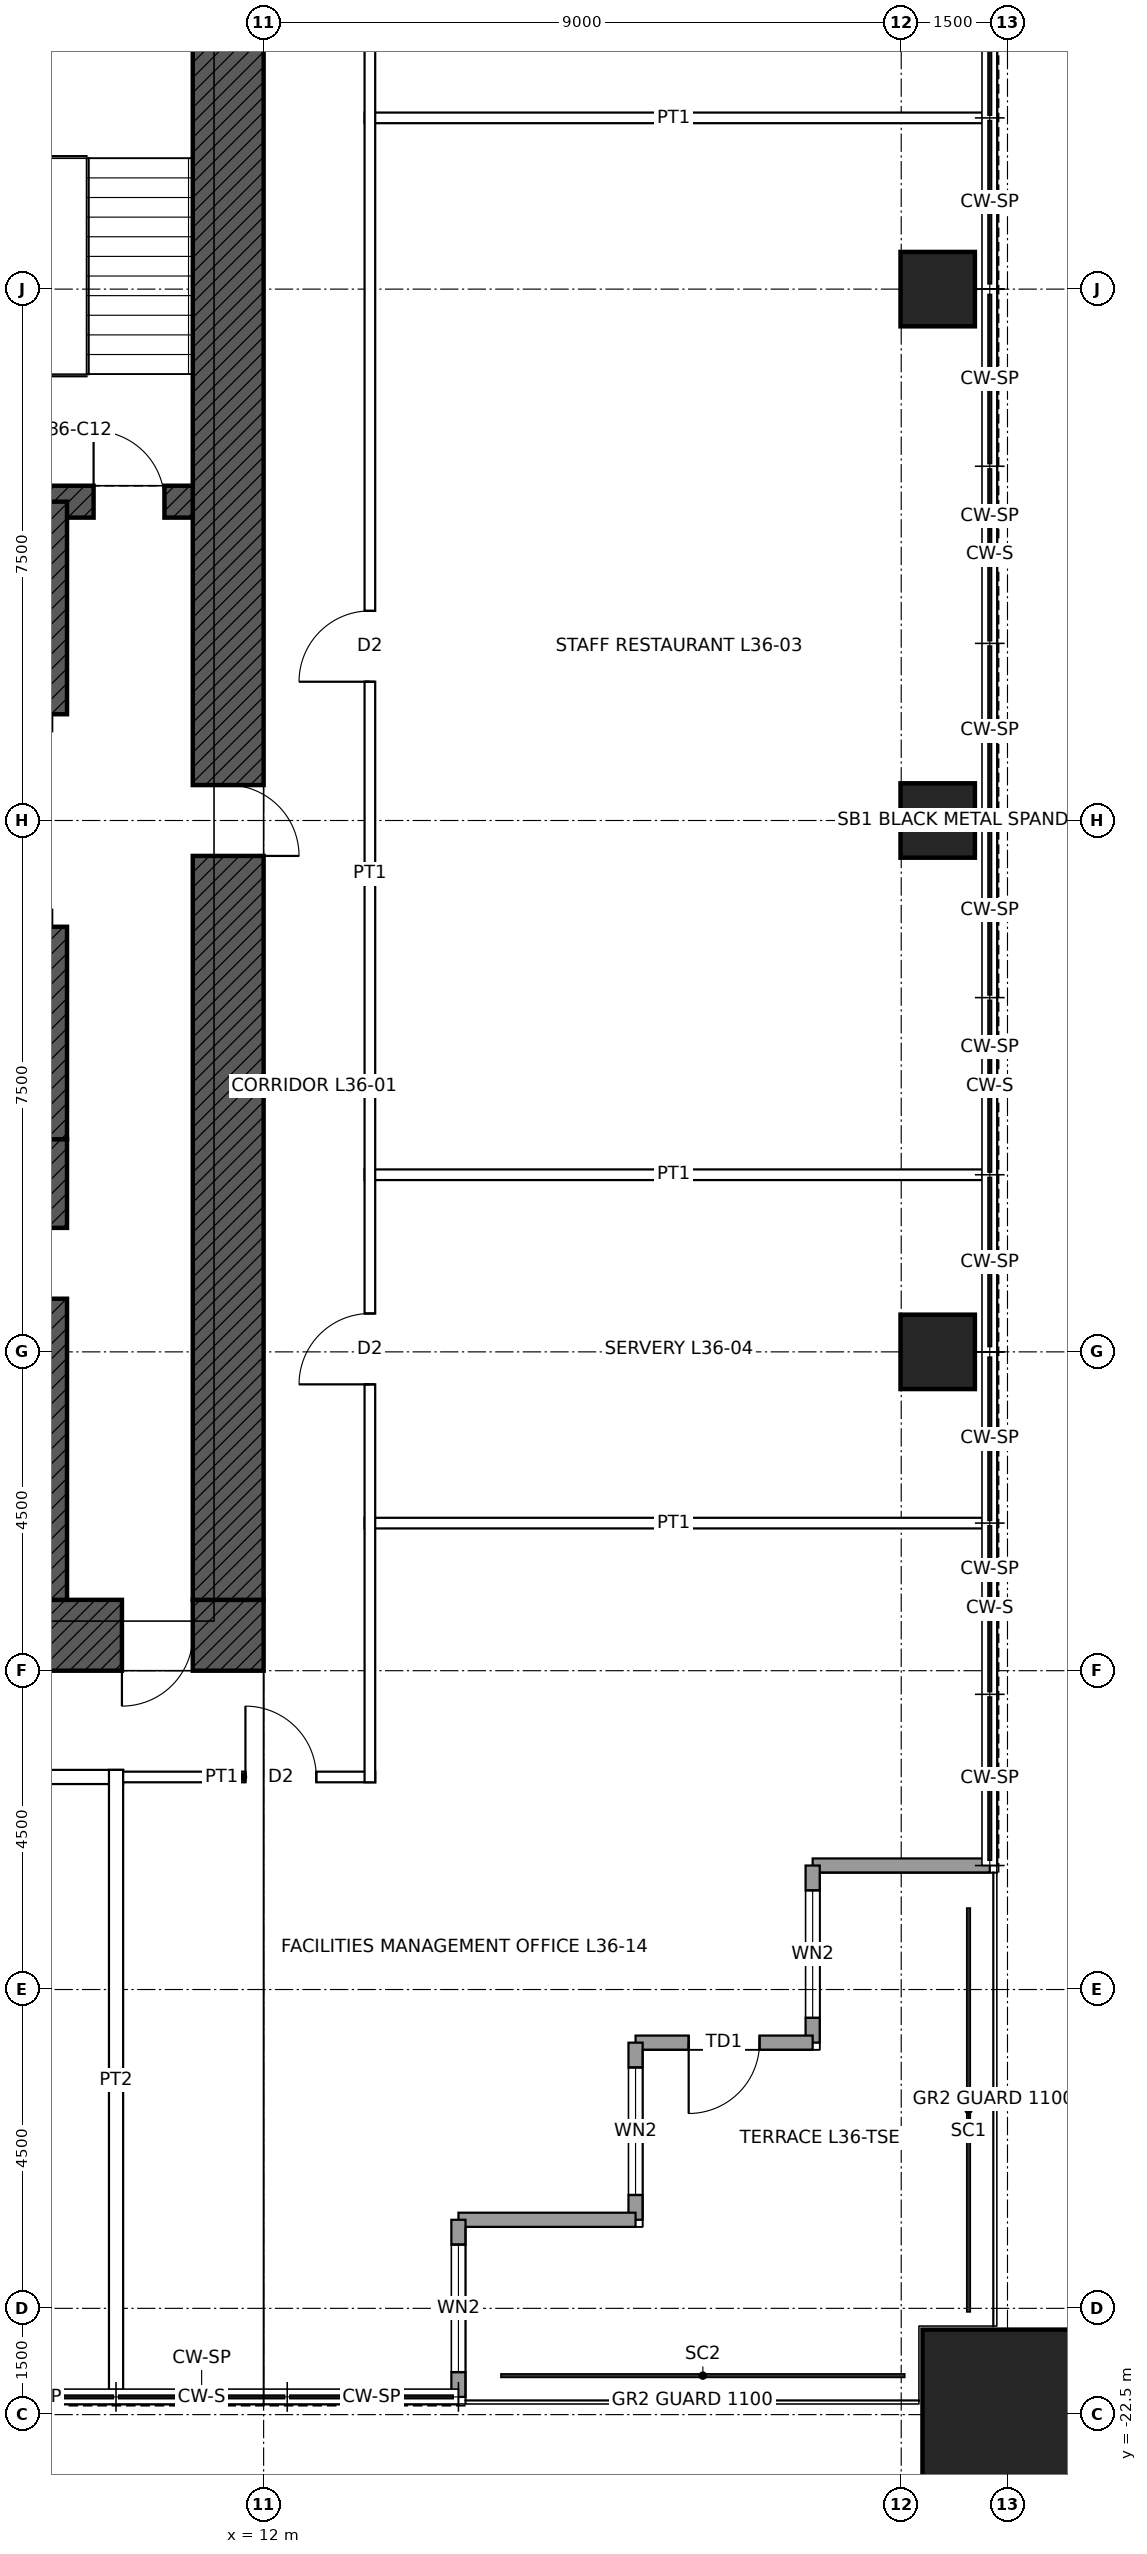
"""IFC4 building model, lengths in metres.
Left out: names, types, materials, properties, quantities, classifications, styles, units other than length and angle.
Written with IfcOpenShell. Run it as: python <this file> out.ifc"""

import sys

from ifc_helpers import new_model, si_unit, direction, frame, frame_2d, origin, origin_2d, place, context, subcontext, project, spatial, rectangle, hollow_rectangle, extrude, element, fill, save


model = new_model("IFC4")
c1 = context("Model", 3, precision=1e-05, world=origin(), true_north=direction((0.0, 1.0)))
c2 = subcontext(c1, "Body", "Model", "MODEL_VIEW")
j1 = project(units=[si_unit("LENGTHUNIT", "METRE"), si_unit("PLANEANGLEUNIT", "RADIAN")], contexts=[c1])
p1 = place(None, origin())
s1 = spatial("IfcSite", under=j1, at=p1, CompositionType="ELEMENT")
p2 = place(p1, origin())
s2 = spatial("IfcBuilding", under=s1, at=p2, CompositionType="ELEMENT")
p3 = place(p2, frame((0.0, 0.0, 177.9)))
s3 = spatial("IfcBuildingStorey", under=s2, at=p3, CompositionType="ELEMENT", Elevation=177.9)
p4 = place(p3, frame((22.5, -22.5, 0.0), z_axis=(0.0, 0.0, 1.0), x_axis=(1.0, 0.0, 0.0)))
e1 = element("IfcColumn", 1, at=p4, inside=s3, PredefinedType="COLUMN", context=c2, shape_type="SweptSolid", body=[
    extrude(hollow_rectangle(XDim=2.4, YDim=2.4, WallThickness=0.12, at=origin_2d()), origin(), (0.0, 0.0, 1.0), 4.0),
])
p5 = place(p3, frame((21.515, 7.5, 0.0), z_axis=(0.0, 0.0, 1.0), x_axis=(1.0, 0.0, 0.0)))
e2 = element("IfcColumn", 2, at=p5, inside=s3, PredefinedType="COLUMN", context=c2, shape_type="SweptSolid", body=[
    extrude(hollow_rectangle(XDim=1.05, YDim=1.05, WallThickness=0.075, at=origin_2d()), origin(), (0.0, 0.0, 1.0), 4.0),
])
p6 = place(p3, frame((21.515, 0.0, 0.0), z_axis=(0.0, 0.0, 1.0), x_axis=(1.0, 0.0, 0.0)))
e3 = element("IfcColumn", 3, at=p6, inside=s3, PredefinedType="COLUMN", context=c2, shape_type="SweptSolid", body=[
    extrude(hollow_rectangle(XDim=1.05, YDim=1.05, WallThickness=0.07, at=origin_2d()), origin(), (0.0, 0.0, 1.0), 4.0),
])
p7 = place(p3, frame((21.515, -7.5, 0.0), z_axis=(0.0, 0.0, 1.0), x_axis=(1.0, 0.0, 0.0)))
e4 = element("IfcColumn", 4, at=p7, inside=s3, PredefinedType="COLUMN", context=c2, shape_type="SweptSolid", body=[
    extrude(hollow_rectangle(XDim=1.05, YDim=1.05, WallThickness=0.075, at=origin_2d()), origin(), (0.0, 0.0, 1.0), 4.0),
])
p8 = place(p3, frame((12.0, -11.5, 0.0), z_axis=(0.0, 0.0, 1.0), x_axis=(-1.0, 0.0, 0.0)))
e5 = element("IfcWall", 5, at=p8, inside=s3, PredefinedType="SHEAR", context=c2, shape_type="SweptSolid", body=[
    extrude(rectangle(XDim=24.0, YDim=1.0, at=frame_2d((12.0, 0.0))), origin(), (0.0, 0.0, 1.0), 4.0),
])
p9 = place(p8, frame((11.5, 0.0, 0.0)))
e6 = element("IfcOpeningElement", 6, at=p9, cuts=e5, PredefinedType="OPENING", context=c2, shape_type="SweptSolid", body=[
    extrude(rectangle(XDim=1.0, YDim=2.1, at=frame_2d((0.5, 1.05))), frame((0.0, 0.51, 0.0), z_axis=(0.0, -1.0, 0.0), x_axis=(1.0, 0.0, 0.0)), (0.0, 0.0, 1.0), 1.02),
])
p10 = place(p8, frame((1.0, 0.0, 0.0)))
e7 = element("IfcOpeningElement", 7, at=p10, cuts=e5, PredefinedType="OPENING", context=c2, shape_type="SweptSolid", body=[
    extrude(rectangle(XDim=1.0, YDim=2.4, at=frame_2d((0.5, 1.2))), frame((0.0, 0.51, 0.0), z_axis=(0.0, -1.0, 0.0), x_axis=(1.0, 0.0, 0.0)), (0.0, 0.0, 1.0), 1.02),
])
p11 = place(p3, frame((11.5, 11.0, 0.0), z_axis=(0.0, 0.0, 1.0), x_axis=(0.0, -1.0, 0.0)))
e8 = element("IfcWall", 8, at=p11, inside=s3, PredefinedType="SHEAR", context=c2, shape_type="SweptSolid", body=[
    extrude(rectangle(XDim=22.0, YDim=1.0, at=frame_2d((11.0, 0.0))), origin(), (0.0, 0.0, 1.0), 4.0),
])
p12 = place(p11, frame((10.5, 0.0, 0.0)))
e9 = element("IfcOpeningElement", 9, at=p12, cuts=e8, PredefinedType="OPENING", context=c2, shape_type="SweptSolid", body=[
    extrude(rectangle(XDim=1.0, YDim=2.4, at=frame_2d((0.5, 1.2))), frame((0.0, 0.51, 0.0), z_axis=(0.0, -1.0, 0.0), x_axis=(1.0, 0.0, 0.0)), (0.0, 0.0, 1.0), 1.02),
])
p13 = place(p3, frame((-11.0, 4.5, 0.0), z_axis=(0.0, 0.0, 1.0), x_axis=(1.0, 0.0, 0.0)))
e10 = element("IfcWall", 10, at=p13, inside=s3, PredefinedType="SHEAR", context=c2, shape_type="SweptSolid", body=[
    extrude(rectangle(XDim=22.0, YDim=0.45, at=frame_2d((11.0, 0.0))), origin(), (0.0, 0.0, 1.0), 4.0),
])
p14 = place(p13, frame((0.4, 0.0, 0.0)))
e11 = element("IfcOpeningElement", 11, at=p14, cuts=e10, PredefinedType="OPENING", context=c2, shape_type="SweptSolid", body=[
    extrude(rectangle(XDim=1.0, YDim=2.1, at=frame_2d((0.5, 1.05))), frame((0.0, 0.235, 0.0), z_axis=(0.0, -1.0, 0.0), x_axis=(1.0, 0.0, 0.0)), (0.0, 0.0, 1.0), 0.47),
])
p15 = place(p13, frame((20.6, 0.0, 0.0)))
e12 = element("IfcOpeningElement", 12, at=p15, cuts=e10, PredefinedType="OPENING", context=c2, shape_type="SweptSolid", body=[
    extrude(rectangle(XDim=1.0, YDim=2.1, at=frame_2d((0.5, 1.05))), frame((0.0, 0.235, 0.0), z_axis=(0.0, -1.0, 0.0), x_axis=(1.0, 0.0, 0.0)), (0.0, 0.0, 1.0), 0.47),
])
for number, where, z_axis, x_axis in (
    (13, (9.0, 1.5, 0.0), (0.0, 0.0, 1.0), (0.0, 1.0, 0.0)),
    (14, (9.0, -4.5, 0.0), (0.0, 0.0, 1.0), (0.0, 1.0, 0.0)),
):
    element("IfcWall", number, at=place(p3, frame(where, z_axis=z_axis, x_axis=x_axis)), inside=s3, PredefinedType="SHEAR", context=c2, shape_type="SweptSolid", body=[
        extrude(rectangle(XDim=3.0, YDim=0.45, at=frame_2d((1.5, 0.0))), origin(), (0.0, 0.0, 1.0), 4.0),
    ])
p16 = place(p3, frame((9.0, -11.0, 0.0), z_axis=(0.0, 0.0, 1.0), x_axis=(0.0, 1.0, 0.0)))
e15 = element("IfcWall", 15, at=p16, inside=s3, PredefinedType="SHEAR", context=c2, shape_type="SweptSolid", body=[
    extrude(rectangle(XDim=6.5, YDim=0.45, at=frame_2d((3.25, 0.0))), origin(), (0.0, 0.0, 1.0), 4.0),
])
p17 = place(p16, frame((4.25, 0.0, 0.0)))
e16 = element("IfcOpeningElement", 16, at=p17, cuts=e15, PredefinedType="OPENING", context=c2, shape_type="SweptSolid", body=[
    extrude(rectangle(XDim=1.0, YDim=2.1, at=frame_2d((0.5, 1.05))), frame((0.0, 0.235, 0.0), z_axis=(0.0, -1.0, 0.0), x_axis=(1.0, 0.0, 0.0)), (0.0, 0.0, 1.0), 0.47),
])
p18 = place(p3, frame((22.25, -14.75, 0.0), z_axis=(0.0, 0.0, 1.0), x_axis=(-1.0, 0.0, 0.0)))
e17 = element("IfcWall", 17, at=p18, inside=s3, PredefinedType="SOLIDWALL", context=c2, shape_type="SweptSolid", body=[
    extrude(rectangle(XDim=2.5, YDim=0.2, at=frame_2d((1.25, 0.0))), origin(), (0.0, 0.0, 1.0), 3.85),
])
p19 = place(p3, frame((19.75, -14.75, 0.0), z_axis=(0.0, 0.0, 1.0), x_axis=(0.0, -1.0, 0.0)))
e18 = element("IfcWall", 18, at=p19, inside=s3, PredefinedType="SOLIDWALL", context=c2, shape_type="SweptSolid", body=[
    extrude(rectangle(XDim=2.5, YDim=0.2, at=frame_2d((1.25, 0.0))), origin(), (0.0, 0.0, 1.0), 3.85),
])
p20 = place(p19, frame((0.35, 0.0, 0.3)))
e19 = element("IfcOpeningElement", 19, at=p20, cuts=e18, PredefinedType="OPENING", context=c2, shape_type="SweptSolid", body=[
    extrude(rectangle(XDim=1.8, YDim=2.4, at=frame_2d((0.9, 1.2))), frame((0.0, 0.11, 0.0), z_axis=(0.0, -1.0, 0.0), x_axis=(1.0, 0.0, 0.0)), (0.0, 0.0, 1.0), 0.22),
])
p21 = place(p3, frame((19.75, -17.25, 0.0), z_axis=(0.0, 0.0, 1.0), x_axis=(-1.0, 0.0, 0.0)))
e20 = element("IfcWall", 20, at=p21, inside=s3, PredefinedType="SOLIDWALL", context=c2, shape_type="SweptSolid", body=[
    extrude(rectangle(XDim=2.5, YDim=0.2, at=frame_2d((1.25, 0.0))), origin(), (0.0, 0.0, 1.0), 3.85),
])
p22 = place(p21, frame((0.75, 0.0, 0.0)))
e21 = element("IfcOpeningElement", 21, at=p22, cuts=e20, PredefinedType="OPENING", context=c2, shape_type="SweptSolid", body=[
    extrude(rectangle(XDim=1.0, YDim=2.4, at=frame_2d((0.5, 1.2))), frame((0.0, 0.11, 0.0), z_axis=(0.0, -1.0, 0.0), x_axis=(1.0, 0.0, 0.0)), (0.0, 0.0, 1.0), 0.22),
])
p23 = place(p3, frame((17.25, -17.25, 0.0), z_axis=(0.0, 0.0, 1.0), x_axis=(0.0, -1.0, 0.0)))
e22 = element("IfcWall", 22, at=p23, inside=s3, PredefinedType="SOLIDWALL", context=c2, shape_type="SweptSolid", body=[
    extrude(rectangle(XDim=2.5, YDim=0.2, at=frame_2d((1.25, 0.0))), origin(), (0.0, 0.0, 1.0), 3.85),
])
p24 = place(p23, frame((0.35, 0.0, 0.3)))
e23 = element("IfcOpeningElement", 23, at=p24, cuts=e22, PredefinedType="OPENING", context=c2, shape_type="SweptSolid", body=[
    extrude(rectangle(XDim=1.8, YDim=2.4, at=frame_2d((0.9, 1.2))), frame((0.0, 0.11, 0.0), z_axis=(0.0, -1.0, 0.0), x_axis=(1.0, 0.0, 0.0)), (0.0, 0.0, 1.0), 0.22),
])
p25 = place(p3, frame((17.25, -19.75, 0.0), z_axis=(0.0, 0.0, 1.0), x_axis=(-1.0, 0.0, 0.0)))
e24 = element("IfcWall", 24, at=p25, inside=s3, PredefinedType="SOLIDWALL", context=c2, shape_type="SweptSolid", body=[
    extrude(rectangle(XDim=2.5, YDim=0.2, at=frame_2d((1.25, 0.0))), origin(), (0.0, 0.0, 1.0), 3.85),
])
p26 = place(p3, frame((14.75, -19.75, 0.0), z_axis=(0.0, 0.0, 1.0), x_axis=(0.0, -1.0, 0.0)))
e25 = element("IfcWall", 25, at=p26, inside=s3, PredefinedType="SOLIDWALL", context=c2, shape_type="SweptSolid", body=[
    extrude(rectangle(XDim=2.5, YDim=0.2, at=frame_2d((1.25, 0.0))), origin(), (0.0, 0.0, 1.0), 3.85),
])
p27 = place(p26, frame((0.35, 0.0, 0.3)))
e26 = element("IfcOpeningElement", 26, at=p27, cuts=e25, PredefinedType="OPENING", context=c2, shape_type="SweptSolid", body=[
    extrude(rectangle(XDim=1.8, YDim=2.4, at=frame_2d((0.9, 1.2))), frame((0.0, 0.11, 0.0), z_axis=(0.0, -1.0, 0.0), x_axis=(1.0, 0.0, 0.0)), (0.0, 0.0, 1.0), 0.22),
])
p28 = place(p3, frame((-5.1, -13.5, 0.0), z_axis=(0.0, 0.0, 1.0), x_axis=(1.0, 0.0, 0.0)))
e27 = element("IfcWall", 27, at=p28, inside=s3, PredefinedType="PARTITIONING", context=c2, shape_type="SweptSolid", body=[
    extrude(rectangle(XDim=15.117, YDim=0.2, at=frame_2d((7.559, 0.0))), origin(), (0.0, 0.0, 1.0), 3.85),
])
p29 = place(p28, frame((10.809, 0.0, 0.0)))
e28 = element("IfcOpeningElement", 28, at=p29, cuts=e27, PredefinedType="OPENING", context=c2, shape_type="SweptSolid", body=[
    extrude(rectangle(XDim=1.0, YDim=2.1, at=frame_2d((0.5, 1.05))), frame((0.0, 0.11, 0.0), z_axis=(0.0, -1.0, 0.0), x_axis=(1.0, 0.0, 0.0)), (0.0, 0.0, 1.0), 0.22),
])
p30 = place(p28, frame((0.5, 0.0, 0.0)))
e29 = element("IfcOpeningElement", 29, at=p30, cuts=e27, PredefinedType="OPENING", context=c2, shape_type="SweptSolid", body=[
    extrude(rectangle(XDim=1.0, YDim=2.1, at=frame_2d((0.5, 1.05))), frame((0.0, 0.11, 0.0), z_axis=(0.0, -1.0, 0.0), x_axis=(1.0, 0.0, 0.0)), (0.0, 0.0, 1.0), 0.22),
])
p31 = place(p3, frame((9.842, -13.5, 0.0), z_axis=(0.0, 0.0, 1.0), x_axis=(1.0, 0.0, 0.0)))
e30 = element("IfcWall", 30, at=p31, inside=s3, PredefinedType="PARTITIONING", context=c2, shape_type="SweptSolid", body=[
    extrude(rectangle(XDim=3.733, YDim=0.15, at=frame_2d((1.866, 0.0))), origin(), (0.0, 0.0, 1.0), 3.85),
])
p32 = place(p31, frame((1.901, 0.0, 0.0)))
e31 = element("IfcOpeningElement", 31, at=p32, cuts=e30, PredefinedType="OPENING", context=c2, shape_type="SweptSolid", body=[
    extrude(rectangle(XDim=1.0, YDim=2.1, at=frame_2d((0.5, 1.05))), frame((0.0, 0.085, 0.0), z_axis=(0.0, -1.0, 0.0), x_axis=(1.0, 0.0, 0.0)), (0.0, 0.0, 1.0), 0.17),
])
for number, where, z_axis, x_axis in (
    (32, (13.425, -9.917, 0.0), (0.0, 0.0, 1.0), (1.0, 0.0, 0.0)),
    (33, (13.425, -5.0, 0.0), (0.0, 0.0, 1.0), (1.0, 0.0, 0.0)),
    (34, (13.425, 9.917, 0.0), (0.0, 0.0, 1.0), (1.0, 0.0, 0.0)),
):
    element("IfcWall", number, at=place(p3, frame(where, z_axis=z_axis, x_axis=x_axis)), inside=s3, PredefinedType="PARTITIONING", context=c2, shape_type="SweptSolid", body=[
        extrude(rectangle(XDim=8.725, YDim=0.15, at=frame_2d((4.362, 0.0))), origin(), (0.0, 0.0, 1.0), 3.85),
    ])
p33 = place(p3, frame((9.917, -22.15, 0.0), z_axis=(0.0, 0.0, 1.0), x_axis=(0.0, 1.0, 0.0)))
e35 = element("IfcWall", 35, at=p33, inside=s3, PredefinedType="PARTITIONING", context=c2, shape_type="SweptSolid", body=[
    extrude(rectangle(XDim=8.75, YDim=0.2, at=frame_2d((4.375, 0.0))), origin(), (0.0, 0.0, 1.0), 3.85),
])
p34 = place(p3, frame((13.5, -13.575, 0.0), z_axis=(0.0, 0.0, 1.0), x_axis=(0.0, 1.0, 0.0)))
e36 = element("IfcWall", 36, at=p34, inside=s3, PredefinedType="PARTITIONING", context=c2, shape_type="SweptSolid", body=[
    extrude(rectangle(XDim=25.65, YDim=0.15, at=frame_2d((12.825, 0.0))), origin(), (0.0, 0.0, 1.0), 3.85),
])
p35 = place(p34, frame((15.533, 0.0, 0.0)))
e37 = element("IfcOpeningElement", 37, at=p35, cuts=e36, PredefinedType="OPENING", context=c2, shape_type="SweptSolid", body=[
    extrude(rectangle(XDim=1.0, YDim=2.1, at=frame_2d((0.5, 1.05))), frame((0.0, 0.085, 0.0), z_axis=(0.0, -1.0, 0.0), x_axis=(1.0, 0.0, 0.0)), (0.0, 0.0, 1.0), 0.17),
])
p36 = place(p34, frame((5.616, 0.0, 0.0)))
e38 = element("IfcOpeningElement", 38, at=p36, cuts=e36, PredefinedType="OPENING", context=c2, shape_type="SweptSolid", body=[
    extrude(rectangle(XDim=1.0, YDim=2.1, at=frame_2d((0.5, 1.05))), frame((0.0, 0.085, 0.0), z_axis=(0.0, -1.0, 0.0), x_axis=(1.0, 0.0, 0.0)), (0.0, 0.0, 1.0), 0.17),
])
p37 = place(p20, origin())
e39 = element("IfcWindow", 39, at=p37, inside=s3, PartitioningType="SINGLE_PANEL", PredefinedType="WINDOW", context=c2, shape_type="SweptSolid", body=[
    extrude(rectangle(XDim=1.8, YDim=2.4, at=frame_2d((0.9, 1.2))), frame((0.0, 0.03, 0.0), z_axis=(0.0, -1.0, 0.0), x_axis=(1.0, 0.0, 0.0)), (0.0, 0.0, 1.0), 0.06),
])
fill(e19, e39)
p38 = place(p22, origin())
e40 = element("IfcDoor", 40, at=p38, inside=s3, OperationType="SINGLE_SWING_RIGHT", PredefinedType="DOOR", context=c2, shape_type="SweptSolid", body=[
    extrude(rectangle(XDim=1.0, YDim=2.4, at=frame_2d((0.5, 1.2))), frame((0.0, 0.025, 0.0), z_axis=(0.0, -1.0, 0.0), x_axis=(1.0, 0.0, 0.0)), (0.0, 0.0, 1.0), 0.05),
])
fill(e21, e40)
p39 = place(p24, origin())
e41 = element("IfcWindow", 41, at=p39, inside=s3, PartitioningType="SINGLE_PANEL", PredefinedType="WINDOW", context=c2, shape_type="SweptSolid", body=[
    extrude(rectangle(XDim=1.8, YDim=2.4, at=frame_2d((0.9, 1.2))), frame((0.0, 0.03, 0.0), z_axis=(0.0, -1.0, 0.0), x_axis=(1.0, 0.0, 0.0)), (0.0, 0.0, 1.0), 0.06),
])
fill(e23, e41)
p40 = place(p27, origin())
e42 = element("IfcWindow", 42, at=p40, inside=s3, PartitioningType="SINGLE_PANEL", PredefinedType="WINDOW", context=c2, shape_type="SweptSolid", body=[
    extrude(rectangle(XDim=1.8, YDim=2.4, at=frame_2d((0.9, 1.2))), frame((0.0, 0.03, 0.0), z_axis=(0.0, -1.0, 0.0), x_axis=(1.0, 0.0, 0.0)), (0.0, 0.0, 1.0), 0.06),
])
fill(e26, e42)
p41 = place(p15, origin())
e43 = element("IfcDoor", 43, at=p41, inside=s3, OperationType="SINGLE_SWING_LEFT", PredefinedType="DOOR", context=c2, shape_type="SweptSolid", body=[
    extrude(rectangle(XDim=1.0, YDim=2.1, at=frame_2d((0.5, 1.05))), frame((0.0, 0.025, 0.0), z_axis=(0.0, -1.0, 0.0), x_axis=(1.0, 0.0, 0.0)), (0.0, 0.0, 1.0), 0.05),
])
fill(e12, e43)
p42 = place(p12, origin())
e44 = element("IfcDoor", 44, at=p42, inside=s3, OperationType="SINGLE_SWING_RIGHT", PredefinedType="DOOR", context=c2, shape_type="SweptSolid", body=[
    extrude(rectangle(XDim=1.0, YDim=2.4, at=frame_2d((0.5, 1.2))), frame((0.0, 0.485, 0.0), z_axis=(0.0, -1.0, 0.0), x_axis=(1.0, 0.0, 0.0)), (0.0, 0.0, 1.0), 0.05),
])
fill(e9, e44)
p43 = place(p10, origin())
e45 = element("IfcDoor", 45, at=p43, inside=s3, OperationType="SINGLE_SWING_RIGHT", PredefinedType="DOOR", context=c2, shape_type="SweptSolid", body=[
    extrude(rectangle(XDim=1.0, YDim=2.4, at=frame_2d((0.5, 1.2))), frame((0.0, 0.485, 0.0), z_axis=(0.0, -1.0, 0.0), x_axis=(1.0, 0.0, 0.0)), (0.0, 0.0, 1.0), 0.05),
])
fill(e7, e45)
p44 = place(p17, origin())
e46 = element("IfcDoor", 46, at=p44, inside=s3, OperationType="SINGLE_SWING_LEFT", PredefinedType="DOOR", context=c2, shape_type="SweptSolid", body=[
    extrude(rectangle(XDim=1.0, YDim=2.1, at=frame_2d((0.5, 1.05))), frame((0.0, 0.025, 0.0), z_axis=(0.0, -1.0, 0.0), x_axis=(1.0, 0.0, 0.0)), (0.0, 0.0, 1.0), 0.05),
])
fill(e16, e46)
p45 = place(p35, origin())
e47 = element("IfcDoor", 47, at=p45, inside=s3, OperationType="SINGLE_SWING_LEFT", PredefinedType="DOOR", context=c2, shape_type="SweptSolid", body=[
    extrude(rectangle(XDim=1.0, YDim=2.1, at=frame_2d((0.5, 1.05))), frame((0.0, 0.025, 0.0), z_axis=(0.0, -1.0, 0.0), x_axis=(1.0, 0.0, 0.0)), (0.0, 0.0, 1.0), 0.05),
])
fill(e37, e47)
p46 = place(p36, origin())
e48 = element("IfcDoor", 48, at=p46, inside=s3, OperationType="SINGLE_SWING_LEFT", PredefinedType="DOOR", context=c2, shape_type="SweptSolid", body=[
    extrude(rectangle(XDim=1.0, YDim=2.1, at=frame_2d((0.5, 1.05))), frame((0.0, 0.025, 0.0), z_axis=(0.0, -1.0, 0.0), x_axis=(1.0, 0.0, 0.0)), (0.0, 0.0, 1.0), 0.05),
])
fill(e38, e48)
p47 = place(p32, origin())
e49 = element("IfcDoor", 49, at=p47, inside=s3, OperationType="SINGLE_SWING_LEFT", PredefinedType="DOOR", context=c2, shape_type="SweptSolid", body=[
    extrude(rectangle(XDim=1.0, YDim=2.1, at=frame_2d((0.5, 1.05))), frame((0.0, 0.025, 0.0), z_axis=(0.0, -1.0, 0.0), x_axis=(1.0, 0.0, 0.0)), (0.0, 0.0, 1.0), 0.05),
])
fill(e31, e49)
save(model, sys.argv[1])
